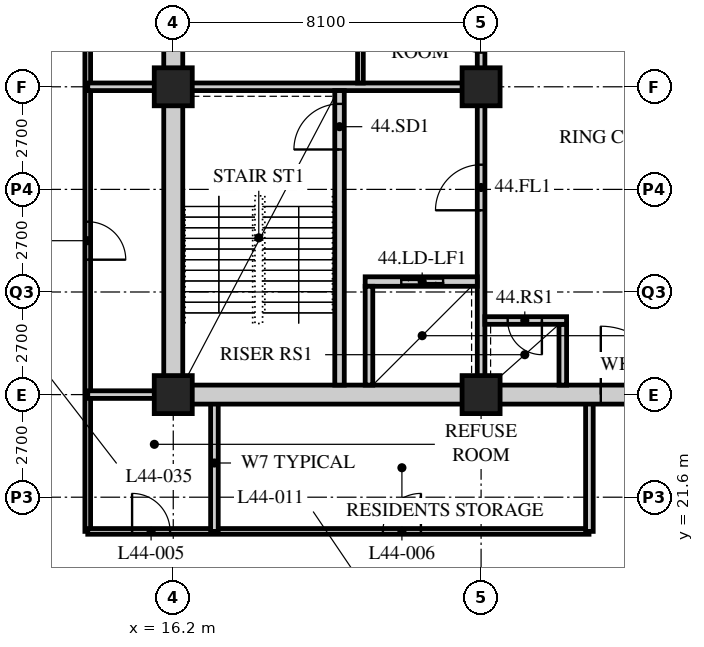
"""IFC4 building model, lengths in metres.
Left out: names, types, materials, properties, quantities, classifications, styles, units other than length and angle.
Written with IfcOpenShell. Run it as: python <this file> out.ifc"""

import sys

from ifc_helpers import new_model, si_unit, direction, frame, frame_2d, origin, origin_2d, place, context, subcontext, project, spatial, rectangle, hollow_rectangle, extrude, element, fill, save


model = new_model("IFC4")
c1 = context("Model", 3, precision=1e-05, world=origin(), true_north=direction((0.0, 1.0)))
c2 = subcontext(c1, "Body", "Model", "MODEL_VIEW")
j1 = project(units=[si_unit("LENGTHUNIT", "METRE"), si_unit("PLANEANGLEUNIT", "RADIAN")], contexts=[c1])
p1 = place(None, origin())
s1 = spatial("IfcSite", under=j1, at=p1, CompositionType="ELEMENT")
p2 = place(p1, origin())
s2 = spatial("IfcBuilding", under=s1, at=p2, CompositionType="ELEMENT")
p3 = place(p2, frame((0.0, 0.0, 174.0)))
s3 = spatial("IfcBuildingStorey", under=s2, at=p3, CompositionType="ELEMENT", Elevation=174.0)
for number, where, z_axis, x_axis in (
    (1, (16.2, 24.3, 0.0), (0.0, 0.0, 1.0), (1.0, 0.0, 0.0)),
    (2, (16.2, 32.4, 0.0), (0.0, 0.0, 1.0), (1.0, 0.0, 0.0)),
    (3, (24.3, 24.3, 0.0), (0.0, 0.0, 1.0), (1.0, 0.0, 0.0)),
    (4, (24.3, 32.4, 0.0), (0.0, 0.0, 1.0), (1.0, 0.0, 0.0)),
):
    element("IfcColumn", number, at=place(p3, frame(where, z_axis=z_axis, x_axis=x_axis)), inside=s3, PredefinedType="COLUMN", context=c2, shape_type="SweptSolid", body=[
        extrude(hollow_rectangle(XDim=1.0, YDim=1.0, WallThickness=0.1, at=origin_2d()), origin(), (0.0, 0.0, 1.0), 3.6),
    ])
p4 = place(p3, frame((13.95, 40.5, 0.0), z_axis=(0.0, 0.0, 1.0), x_axis=(0.0, -1.0, 0.0)))
e5 = element("IfcWall", 5, at=p4, inside=s3, PredefinedType="PARTITIONING", context=c2, shape_type="SweptSolid", body=[
    extrude(rectangle(XDim=19.8, YDim=0.15, at=frame_2d((9.9, 0.0))), origin(), (0.0, 0.0, 1.0), 3.39),
])
p5 = place(p4, frame((11.65, 0.0, 0.0)))
e6 = element("IfcOpeningElement", 6, at=p5, cuts=e5, PredefinedType="OPENING", context=c2, shape_type="SweptSolid", body=[
    extrude(rectangle(XDim=1.0, YDim=2.1, at=frame_2d((0.5, 1.05))), frame((0.0, 0.085, 0.0), z_axis=(0.0, -1.0, 0.0), x_axis=(1.0, 0.0, 0.0)), (0.0, 0.0, 1.0), 0.17),
])
p6 = place(p4, frame((3.55, 0.0, 0.0)))
e7 = element("IfcOpeningElement", 7, at=p6, cuts=e5, PredefinedType="OPENING", context=c2, shape_type="SweptSolid", body=[
    extrude(rectangle(XDim=1.0, YDim=2.1, at=frame_2d((0.5, 1.05))), frame((0.0, 0.085, 0.0), z_axis=(0.0, -1.0, 0.0), x_axis=(1.0, 0.0, 0.0)), (0.0, 0.0, 1.0), 0.17),
])
p7 = place(p3, frame((13.95, 20.7, 0.0), z_axis=(0.0, 0.0, 1.0), x_axis=(1.0, 0.0, 0.0)))
e8 = element("IfcWall", 8, at=p7, inside=s3, PredefinedType="PARTITIONING", context=c2, shape_type="SweptSolid", body=[
    extrude(rectangle(XDim=13.19, YDim=0.15, at=frame_2d((6.595, 0.0))), origin(), (0.0, 0.0, 1.0), 3.39),
])
p8 = place(p7, frame((1.167, 0.0, 0.0)))
e9 = element("IfcOpeningElement", 9, at=p8, cuts=e8, PredefinedType="OPENING", context=c2, shape_type="SweptSolid", body=[
    extrude(rectangle(XDim=1.0, YDim=2.1, at=frame_2d((0.5, 1.05))), frame((0.0, 0.085, 0.0), z_axis=(0.0, -1.0, 0.0), x_axis=(1.0, 0.0, 0.0)), (0.0, 0.0, 1.0), 0.17),
])
p9 = place(p7, frame((7.767, 0.0, 0.0)))
e10 = element("IfcOpeningElement", 10, at=p9, cuts=e8, PredefinedType="OPENING", context=c2, shape_type="SweptSolid", body=[
    extrude(rectangle(XDim=1.0, YDim=2.1, at=frame_2d((0.5, 1.05))), frame((0.0, 0.085, 0.0), z_axis=(0.0, -1.0, 0.0), x_axis=(1.0, 0.0, 0.0)), (0.0, 0.0, 1.0), 0.17),
])
p10 = place(p3, frame((13.95, 32.4, 0.0), z_axis=(0.0, 0.0, 1.0), x_axis=(1.0, 0.0, 0.0)))
e11 = element("IfcWall", 11, at=p10, inside=s3, PredefinedType="SOLIDWALL", context=c2, shape_type="SweptSolid", body=[
    extrude(rectangle(XDim=2.25, YDim=0.2, at=frame_2d((1.125, 0.0))), origin(), (0.0, 0.0, 1.0), 3.39),
])
for number, where, z_axis, x_axis in (
    (12, (17.283, 20.7, 0.0), (0.0, 0.0, 1.0), (0.0, 1.0, 0.0)),
    (13, (27.15, 20.7, 0.0), (0.0, 0.0, 1.0), (0.0, 1.0, 0.0)),
):
    element("IfcWall", number, at=place(p3, frame(where, z_axis=z_axis, x_axis=x_axis)), inside=s3, PredefinedType="SOLIDWALL", context=c2, shape_type="SweptSolid", body=[
        extrude(rectangle(XDim=3.6, YDim=0.2, at=frame_2d((1.8, 0.0))), origin(), (0.0, 0.0, 1.0), 3.39),
    ])
p11 = place(p3, frame((13.95, 24.3, 0.0), z_axis=(0.0, 0.0, 1.0), x_axis=(1.0, 0.0, 0.0)))
e14 = element("IfcWall", 14, at=p11, inside=s3, PredefinedType="SOLIDWALL", context=c2, shape_type="SweptSolid", body=[
    extrude(rectangle(XDim=2.25, YDim=0.2, at=frame_2d((1.125, 0.0))), origin(), (0.0, 0.0, 1.0), 3.39),
])
p12 = place(p3, frame((15.95, 24.3, 0.0), z_axis=(0.0, 0.0, 1.0), x_axis=(1.0, 0.0, 0.0)))
e15 = element("IfcWall", 15, at=p12, inside=s3, PredefinedType="SOLIDWALL", context=c2, shape_type="SweptSolid", body=[
    extrude(rectangle(XDim=24.8, YDim=0.5, at=frame_2d((12.4, 0.0))), origin(), (0.0, 0.0, 1.0), 2.74),
])
p13 = place(p12, frame((11.5, 0.0, 0.0)))
e16 = element("IfcOpeningElement", 16, at=p13, cuts=e15, PredefinedType="OPENING", context=c2, shape_type="SweptSolid", body=[
    extrude(rectangle(XDim=1.8, YDim=2.4, at=frame_2d((0.9, 1.2))), frame((0.0, 0.26, 0.0), z_axis=(0.0, -1.0, 0.0), x_axis=(1.0, 0.0, 0.0)), (0.0, 0.0, 1.0), 0.52),
])
p14 = place(p3, frame((16.2, 24.55, 0.0), z_axis=(0.0, 0.0, 1.0), x_axis=(0.0, 1.0, 0.0)))
e17 = element("IfcWall", 17, at=p14, inside=s3, PredefinedType="SOLIDWALL", context=c2, shape_type="SweptSolid", body=[
    extrude(rectangle(XDim=15.7, YDim=0.5, at=frame_2d((7.85, 0.0))), origin(), (0.0, 0.0, 1.0), 2.778),
])
p15 = place(p3, frame((16.45, 32.4, 0.0), z_axis=(0.0, 0.0, 1.0), x_axis=(1.0, 0.0, 0.0)))
e18 = element("IfcWall", 18, at=p15, inside=s3, PredefinedType="SOLIDWALL", context=c2, shape_type="SweptSolid", body=[
    extrude(rectangle(XDim=7.95, YDim=0.2, at=frame_2d((3.975, 0.0))), origin(), (0.0, 0.0, 1.0), 2.778),
])
p16 = place(p3, frame((24.3, 24.55, 0.0), z_axis=(0.0, 0.0, 1.0), x_axis=(0.0, 1.0, 0.0)))
e19 = element("IfcWall", 19, at=p16, inside=s3, PredefinedType="SOLIDWALL", context=c2, shape_type="SweptSolid", body=[
    extrude(rectangle(XDim=7.75, YDim=0.2, at=frame_2d((3.875, 0.0))), origin(), (0.0, 0.0, 1.0), 2.778),
])
p17 = place(p16, frame((4.6, 0.0, 0.0)))
e20 = element("IfcOpeningElement", 20, at=p17, cuts=e19, PredefinedType="OPENING", context=c2, shape_type="SweptSolid", body=[
    extrude(rectangle(XDim=1.2, YDim=2.1, at=frame_2d((0.6, 1.05))), frame((0.0, 0.11, 0.0), z_axis=(0.0, -1.0, 0.0), x_axis=(1.0, 0.0, 0.0)), (0.0, 0.0, 1.0), 0.22),
])
p18 = place(p3, frame((20.575, 24.55, 0.0), z_axis=(0.0, 0.0, 1.0), x_axis=(0.0, 1.0, 0.0)))
e21 = element("IfcWall", 21, at=p18, inside=s3, PredefinedType="SOLIDWALL", context=c2, shape_type="SweptSolid", body=[
    extrude(rectangle(XDim=7.75, YDim=0.25, at=frame_2d((3.875, 0.0))), origin(), (0.0, 0.0, 1.0), 3.39),
])
p19 = place(p18, frame((6.2, 0.0, 0.0)))
e22 = element("IfcOpeningElement", 22, at=p19, cuts=e21, PredefinedType="OPENING", context=c2, shape_type="SweptSolid", body=[
    extrude(rectangle(XDim=1.2, YDim=2.1, at=frame_2d((0.6, 1.05))), frame((0.0, 0.135, 0.0), z_axis=(0.0, -1.0, 0.0), x_axis=(1.0, 0.0, 0.0)), (0.0, 0.0, 1.0), 0.27),
])
p20 = place(p3, frame((21.25, 27.275, 0.0), z_axis=(0.0, 0.0, 1.0), x_axis=(1.0, 0.0, 0.0)))
e23 = element("IfcWall", 23, at=p20, inside=s3, PredefinedType="SOLIDWALL", context=c2, shape_type="SweptSolid", body=[
    extrude(rectangle(XDim=2.95, YDim=0.25, at=frame_2d((1.475, 0.0))), origin(), (0.0, 0.0, 1.0), 3.39),
])
p21 = place(p20, frame((0.95, 0.0, 0.0)))
e24 = element("IfcOpeningElement", 24, at=p21, cuts=e23, PredefinedType="OPENING", context=c2, shape_type="SweptSolid", body=[
    extrude(rectangle(XDim=1.1, YDim=2.4, at=frame_2d((0.55, 1.2))), frame((0.0, 0.135, 0.0), z_axis=(0.0, -1.0, 0.0), x_axis=(1.0, 0.0, 0.0)), (0.0, 0.0, 1.0), 0.27),
])
p22 = place(p3, frame((21.35, 24.55, 0.0), z_axis=(0.0, 0.0, 1.0), x_axis=(0.0, 1.0, 0.0)))
e25 = element("IfcWall", 25, at=p22, inside=s3, PredefinedType="SOLIDWALL", context=c2, shape_type="SweptSolid", body=[
    extrude(rectangle(XDim=2.6, YDim=0.2, at=frame_2d((1.3, 0.0))), origin(), (0.0, 0.0, 1.0), 3.39),
])
p23 = place(p3, frame((26.45, 24.55, 0.0), z_axis=(0.0, 0.0, 1.0), x_axis=(0.0, 1.0, 0.0)))
e26 = element("IfcWall", 26, at=p23, inside=s3, PredefinedType="SOLIDWALL", context=c2, shape_type="SweptSolid", body=[
    extrude(rectangle(XDim=1.6, YDim=0.2, at=frame_2d((0.8, 0.0))), origin(), (0.0, 0.0, 1.0), 3.39),
])
p24 = place(p3, frame((24.4, 26.25, 0.0), z_axis=(0.0, 0.0, 1.0), x_axis=(1.0, 0.0, 0.0)))
e27 = element("IfcWall", 27, at=p24, inside=s3, PredefinedType="SOLIDWALL", context=c2, shape_type="SweptSolid", body=[
    extrude(rectangle(XDim=2.15, YDim=0.2, at=frame_2d((1.075, 0.0))), origin(), (0.0, 0.0, 1.0), 3.39),
])
p25 = place(p24, frame((0.6, 0.0, 0.0)))
e28 = element("IfcOpeningElement", 28, at=p25, cuts=e27, PredefinedType="OPENING", context=c2, shape_type="SweptSolid", body=[
    extrude(rectangle(XDim=0.9, YDim=2.1, at=frame_2d((0.45, 1.05))), frame((0.0, 0.11, 0.0), z_axis=(0.0, -1.0, 0.0), x_axis=(1.0, 0.0, 0.0)), (0.0, 0.0, 1.0), 0.22),
])
p26 = place(p3, frame((24.3, 32.5, 0.0), z_axis=(0.0, 0.0, 1.0), x_axis=(0.0, 1.0, 0.0)))
e29 = element("IfcWall", 29, at=p26, inside=s3, PredefinedType="PARTITIONING", context=c2, shape_type="SweptSolid", body=[
    extrude(rectangle(XDim=7.75, YDim=0.2, at=frame_2d((3.875, 0.0))), origin(), (0.0, 0.0, 1.0), 2.778),
])
p27 = place(p26, frame((0.8, 0.0, 0.0)))
e30 = element("IfcOpeningElement", 30, at=p27, cuts=e29, PredefinedType="OPENING", context=c2, shape_type="SweptSolid", body=[
    extrude(rectangle(XDim=0.9, YDim=2.1, at=frame_2d((0.45, 1.05))), frame((0.0, 0.11, 0.0), z_axis=(0.0, -1.0, 0.0), x_axis=(1.0, 0.0, 0.0)), (0.0, 0.0, 1.0), 0.22),
])
p28 = place(p26, frame((2.65, 0.0, 0.0)))
e31 = element("IfcOpeningElement", 31, at=p28, cuts=e29, PredefinedType="OPENING", context=c2, shape_type="SweptSolid", body=[
    extrude(rectangle(XDim=0.9, YDim=2.1, at=frame_2d((0.45, 1.05))), frame((0.0, 0.11, 0.0), z_axis=(0.0, -1.0, 0.0), x_axis=(1.0, 0.0, 0.0)), (0.0, 0.0, 1.0), 0.22),
])
p29 = place(p26, frame((4.3, 0.0, 0.0)))
e32 = element("IfcOpeningElement", 32, at=p29, cuts=e29, PredefinedType="OPENING", context=c2, shape_type="SweptSolid", body=[
    extrude(rectangle(XDim=0.9, YDim=2.1, at=frame_2d((0.45, 1.05))), frame((0.0, 0.11, 0.0), z_axis=(0.0, -1.0, 0.0), x_axis=(1.0, 0.0, 0.0)), (0.0, 0.0, 1.0), 0.22),
])
p30 = place(p26, frame((6.2, 0.0, 0.0)))
e33 = element("IfcOpeningElement", 33, at=p30, cuts=e29, PredefinedType="OPENING", context=c2, shape_type="SweptSolid", body=[
    extrude(rectangle(XDim=0.9, YDim=2.1, at=frame_2d((0.45, 1.05))), frame((0.0, 0.11, 0.0), z_axis=(0.0, -1.0, 0.0), x_axis=(1.0, 0.0, 0.0)), (0.0, 0.0, 1.0), 0.22),
])
p31 = place(p3, frame((21.125, 32.5, 0.0), z_axis=(0.0, 0.0, 1.0), x_axis=(0.0, 1.0, 0.0)))
e34 = element("IfcWall", 34, at=p31, inside=s3, PredefinedType="PARTITIONING", context=c2, shape_type="SweptSolid", body=[
    extrude(rectangle(XDim=2.2, YDim=0.15, at=frame_2d((1.1, 0.0))), origin(), (0.0, 0.0, 1.0), 3.39),
])
p32 = place(p5, origin())
e35 = element("IfcDoor", 35, at=p32, inside=s3, OperationType="SINGLE_SWING_RIGHT", PredefinedType="DOOR", context=c2, shape_type="SweptSolid", body=[
    extrude(rectangle(XDim=1.0, YDim=2.1, at=frame_2d((0.5, 1.05))), frame((0.0, 0.025, 0.0), z_axis=(0.0, -1.0, 0.0), x_axis=(1.0, 0.0, 0.0)), (0.0, 0.0, 1.0), 0.05),
])
fill(e6, e35)
p33 = place(p8, origin())
e36 = element("IfcDoor", 36, at=p33, inside=s3, OperationType="SINGLE_SWING_LEFT", PredefinedType="DOOR", context=c2, shape_type="SweptSolid", body=[
    extrude(rectangle(XDim=1.0, YDim=2.1, at=frame_2d((0.5, 1.05))), frame((0.0, 0.025, 0.0), z_axis=(0.0, -1.0, 0.0), x_axis=(1.0, 0.0, 0.0)), (0.0, 0.0, 1.0), 0.05),
])
fill(e9, e36)
p34 = place(p9, origin())
e37 = element("IfcDoor", 37, at=p34, inside=s3, OperationType="SINGLE_SWING_RIGHT", PredefinedType="DOOR", context=c2, shape_type="SweptSolid", body=[
    extrude(rectangle(XDim=1.0, YDim=2.1, at=frame_2d((0.5, 1.05))), frame((0.0, 0.025, 0.0), z_axis=(0.0, -1.0, 0.0), x_axis=(1.0, 0.0, 0.0)), (0.0, 0.0, 1.0), 0.05),
])
fill(e10, e37)
p35 = place(p27, origin())
e38 = element("IfcDoor", 38, at=p35, inside=s3, OperationType="SINGLE_SWING_RIGHT", PredefinedType="DOOR", context=c2, shape_type="SweptSolid", body=[
    extrude(rectangle(XDim=0.9, YDim=2.1, at=frame_2d((0.45, 1.05))), frame((0.0, 0.025, 0.0), z_axis=(0.0, -1.0, 0.0), x_axis=(1.0, 0.0, 0.0)), (0.0, 0.0, 1.0), 0.05),
])
fill(e30, e38)
p36 = place(p19, origin())
e39 = element("IfcDoor", 39, at=p36, inside=s3, OperationType="SINGLE_SWING_LEFT", PredefinedType="DOOR", context=c2, shape_type="SweptSolid", body=[
    extrude(rectangle(XDim=1.2, YDim=2.1, at=frame_2d((0.6, 1.05))), frame((0.0, 0.025, 0.0), z_axis=(0.0, -1.0, 0.0), x_axis=(1.0, 0.0, 0.0)), (0.0, 0.0, 1.0), 0.05),
])
fill(e22, e39)
p37 = place(p17, origin())
e40 = element("IfcDoor", 40, at=p37, inside=s3, OperationType="SINGLE_SWING_LEFT", PredefinedType="DOOR", context=c2, shape_type="SweptSolid", body=[
    extrude(rectangle(XDim=1.2, YDim=2.1, at=frame_2d((0.6, 1.05))), frame((0.0, 0.025, 0.0), z_axis=(0.0, -1.0, 0.0), x_axis=(1.0, 0.0, 0.0)), (0.0, 0.0, 1.0), 0.05),
])
fill(e20, e40)
p38 = place(p25, origin())
e41 = element("IfcDoor", 41, at=p38, inside=s3, OperationType="SINGLE_SWING_LEFT", PredefinedType="DOOR", context=c2, shape_type="SweptSolid", body=[
    extrude(rectangle(XDim=0.9, YDim=2.1, at=frame_2d((0.45, 1.05))), frame((0.0, 0.025, 0.0), z_axis=(0.0, -1.0, 0.0), x_axis=(1.0, 0.0, 0.0)), (0.0, 0.0, 1.0), 0.05),
])
fill(e28, e41)
p39 = place(p21, origin())
e42 = element("IfcDoor", 42, at=p39, inside=s3, OperationType="DOUBLE_DOOR_SLIDING", PredefinedType="DOOR", context=c2, shape_type="SweptSolid", body=[
    extrude(rectangle(XDim=1.1, YDim=2.4, at=frame_2d((0.55, 1.2))), frame((0.0, 0.025, 0.0), z_axis=(0.0, -1.0, 0.0), x_axis=(1.0, 0.0, 0.0)), (0.0, 0.0, 1.0), 0.05),
])
fill(e24, e42)
p40 = place(p13, origin())
e43 = element("IfcDoor", 43, at=p40, inside=s3, OperationType="DOUBLE_DOOR_SINGLE_SWING", PredefinedType="DOOR", context=c2, shape_type="SweptSolid", body=[
    extrude(rectangle(XDim=1.8, YDim=2.4, at=frame_2d((0.9, 1.2))), frame((0.0, 0.025, 0.0), z_axis=(0.0, -1.0, 0.0), x_axis=(1.0, 0.0, 0.0)), (0.0, 0.0, 1.0), 0.05),
])
fill(e16, e43)
save(model, sys.argv[1])
